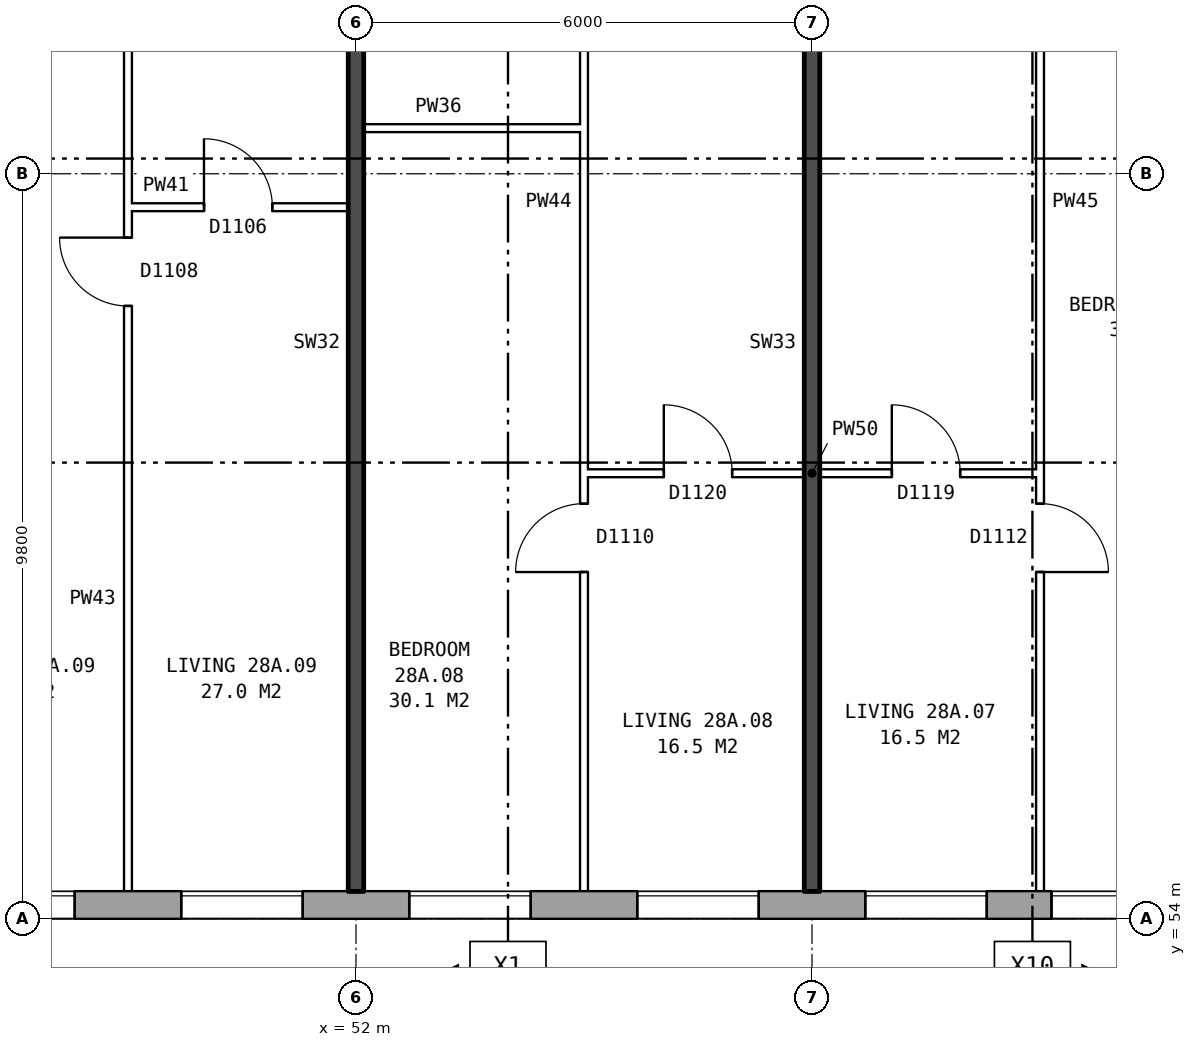
"""IFC4 building model, lengths in metres.
Left out: names, types, materials, properties, quantities, classifications, styles, units other than length and angle.
Written with IfcOpenShell. Run it as: python <this file> out.ifc"""

import sys

from ifc_helpers import new_model, si_unit, direction, frame, frame_2d, origin, place, context, subcontext, project, spatial, rectangle, extrude, element, fill, save


model = new_model("IFC4")
c1 = context("Model", 3, precision=1e-05, world=origin(), true_north=direction((0.0, 1.0)))
c2 = subcontext(c1, "Body", "Model", "MODEL_VIEW")
j1 = project(units=[si_unit("LENGTHUNIT", "METRE"), si_unit("PLANEANGLEUNIT", "RADIAN")], contexts=[c1])
p1 = place(None, origin())
s1 = spatial("IfcSite", under=j1, at=p1, CompositionType="ELEMENT")
p2 = place(p1, origin())
s2 = spatial("IfcBuilding", under=s1, at=p2, CompositionType="ELEMENT")
p3 = place(p2, frame((0.0, 0.0, 102.6)))
s3 = spatial("IfcBuildingStorey", under=s2, at=p3, CompositionType="ELEMENT", Elevation=102.6)
p4 = place(p3, frame((28.075, 54.18, 0.0), z_axis=(0.0, 0.0, 1.0), x_axis=(1.0, 0.0, 0.0)))
e1 = element("IfcWall", 1, at=p4, inside=s3, PredefinedType="STANDARD", context=c2, shape_type="SweptSolid", body=[
    extrude(rectangle(XDim=44.851, YDim=0.36, at=frame_2d((22.425, 0.0))), origin(), (0.0, 0.0, 1.0), 2.85),
])
p5 = place(p4, frame((0.625, 0.0, 0.8)))
e2 = element("IfcOpeningElement", 2, at=p5, cuts=e1, PredefinedType="OPENING", context=c2, shape_type="SweptSolid", body=[
    extrude(rectangle(XDim=1.6, YDim=1.8, at=frame_2d((0.8, 0.9))), frame((0.0, 0.19, 0.0), z_axis=(0.0, -1.0, 0.0), x_axis=(1.0, 0.0, 0.0)), (0.0, 0.0, 1.0), 0.38),
])
p6 = place(p4, frame((3.625, 0.0, 0.8)))
e3 = element("IfcOpeningElement", 3, at=p6, cuts=e1, PredefinedType="OPENING", context=c2, shape_type="SweptSolid", body=[
    extrude(rectangle(XDim=1.6, YDim=1.8, at=frame_2d((0.8, 0.9))), frame((0.0, 0.19, 0.0), z_axis=(0.0, -1.0, 0.0), x_axis=(1.0, 0.0, 0.0)), (0.0, 0.0, 1.0), 0.38),
])
p7 = place(p4, frame((6.125, 0.0, 1.0)))
e4 = element("IfcOpeningElement", 4, at=p7, cuts=e1, PredefinedType="OPENING", context=c2, shape_type="SweptSolid", body=[
    extrude(rectangle(XDim=0.6, YDim=1.5, at=frame_2d((0.3, 0.75))), frame((0.0, 0.19, 0.0), z_axis=(0.0, -1.0, 0.0), x_axis=(1.0, 0.0, 0.0)), (0.0, 0.0, 1.0), 0.38),
])
p8 = place(p4, frame((7.025, 0.0, 1.7)))
e5 = element("IfcOpeningElement", 5, at=p8, cuts=e1, PredefinedType="OPENING", context=c2, shape_type="SweptSolid", body=[
    extrude(rectangle(XDim=0.6, YDim=0.9, at=frame_2d((0.3, 0.45))), frame((0.0, 0.19, 0.0), z_axis=(0.0, -1.0, 0.0), x_axis=(1.0, 0.0, 0.0)), (0.0, 0.0, 1.0), 0.38),
])
p9 = place(p4, frame((12.625, 0.0, 0.8)))
e6 = element("IfcOpeningElement", 6, at=p9, cuts=e1, PredefinedType="OPENING", context=c2, shape_type="SweptSolid", body=[
    extrude(rectangle(XDim=1.6, YDim=1.8, at=frame_2d((0.8, 0.9))), frame((0.0, 0.19, 0.0), z_axis=(0.0, -1.0, 0.0), x_axis=(1.0, 0.0, 0.0)), (0.0, 0.0, 1.0), 0.38),
])
p10 = place(p4, frame((15.625, 0.0, 0.8)))
e7 = element("IfcOpeningElement", 7, at=p10, cuts=e1, PredefinedType="OPENING", context=c2, shape_type="SweptSolid", body=[
    extrude(rectangle(XDim=1.6, YDim=1.8, at=frame_2d((0.8, 0.9))), frame((0.0, 0.19, 0.0), z_axis=(0.0, -1.0, 0.0), x_axis=(1.0, 0.0, 0.0)), (0.0, 0.0, 1.0), 0.38),
])
p11 = place(p4, frame((18.625, 0.0, 0.8)))
e8 = element("IfcOpeningElement", 8, at=p11, cuts=e1, PredefinedType="OPENING", context=c2, shape_type="SweptSolid", body=[
    extrude(rectangle(XDim=1.6, YDim=1.8, at=frame_2d((0.8, 0.9))), frame((0.0, 0.19, 0.0), z_axis=(0.0, -1.0, 0.0), x_axis=(1.0, 0.0, 0.0)), (0.0, 0.0, 1.0), 0.38),
])
p12 = place(p4, frame((21.625, 0.0, 0.8)))
e9 = element("IfcOpeningElement", 9, at=p12, cuts=e1, PredefinedType="OPENING", context=c2, shape_type="SweptSolid", body=[
    extrude(rectangle(XDim=1.6, YDim=1.8, at=frame_2d((0.8, 0.9))), frame((0.0, 0.19, 0.0), z_axis=(0.0, -1.0, 0.0), x_axis=(1.0, 0.0, 0.0)), (0.0, 0.0, 1.0), 0.38),
])
p13 = place(p4, frame((24.625, 0.0, 0.8)))
e10 = element("IfcOpeningElement", 10, at=p13, cuts=e1, PredefinedType="OPENING", context=c2, shape_type="SweptSolid", body=[
    extrude(rectangle(XDim=1.6, YDim=1.8, at=frame_2d((0.8, 0.9))), frame((0.0, 0.19, 0.0), z_axis=(0.0, -1.0, 0.0), x_axis=(1.0, 0.0, 0.0)), (0.0, 0.0, 1.0), 0.38),
])
p14 = place(p4, frame((27.625, 0.0, 0.8)))
e11 = element("IfcOpeningElement", 11, at=p14, cuts=e1, PredefinedType="OPENING", context=c2, shape_type="SweptSolid", body=[
    extrude(rectangle(XDim=1.6, YDim=1.8, at=frame_2d((0.8, 0.9))), frame((0.0, 0.19, 0.0), z_axis=(0.0, -1.0, 0.0), x_axis=(1.0, 0.0, 0.0)), (0.0, 0.0, 1.0), 0.38),
])
p15 = place(p4, frame((30.625, 0.0, 0.8)))
e12 = element("IfcOpeningElement", 12, at=p15, cuts=e1, PredefinedType="OPENING", context=c2, shape_type="SweptSolid", body=[
    extrude(rectangle(XDim=1.6, YDim=1.8, at=frame_2d((0.8, 0.9))), frame((0.0, 0.19, 0.0), z_axis=(0.0, -1.0, 0.0), x_axis=(1.0, 0.0, 0.0)), (0.0, 0.0, 1.0), 0.38),
])
p16 = place(p4, frame((33.075, 0.0, 0.8)))
e13 = element("IfcOpeningElement", 13, at=p16, cuts=e1, PredefinedType="OPENING", context=c2, shape_type="SweptSolid", body=[
    extrude(rectangle(XDim=1.6, YDim=1.8, at=frame_2d((0.8, 0.9))), frame((0.0, 0.19, 0.0), z_axis=(0.0, -1.0, 0.0), x_axis=(1.0, 0.0, 0.0)), (0.0, 0.0, 1.0), 0.38),
])
p17 = place(p4, frame((37.175, 0.0, 1.7)))
e14 = element("IfcOpeningElement", 14, at=p17, cuts=e1, PredefinedType="OPENING", context=c2, shape_type="SweptSolid", body=[
    extrude(rectangle(XDim=1.0, YDim=0.9, at=frame_2d((0.5, 0.45))), frame((0.0, 0.19, 0.0), z_axis=(0.0, -1.0, 0.0), x_axis=(1.0, 0.0, 0.0)), (0.0, 0.0, 1.0), 0.38),
])
p18 = place(p4, frame((39.625, 0.0, 0.8)))
e15 = element("IfcOpeningElement", 15, at=p18, cuts=e1, PredefinedType="OPENING", context=c2, shape_type="SweptSolid", body=[
    extrude(rectangle(XDim=1.6, YDim=1.8, at=frame_2d((0.8, 0.9))), frame((0.0, 0.19, 0.0), z_axis=(0.0, -1.0, 0.0), x_axis=(1.0, 0.0, 0.0)), (0.0, 0.0, 1.0), 0.38),
])
p19 = place(p4, frame((42.625, 0.0, 0.8)))
e16 = element("IfcOpeningElement", 16, at=p19, cuts=e1, PredefinedType="OPENING", context=c2, shape_type="SweptSolid", body=[
    extrude(rectangle(XDim=1.6, YDim=1.8, at=frame_2d((0.8, 0.9))), frame((0.0, 0.19, 0.0), z_axis=(0.0, -1.0, 0.0), x_axis=(1.0, 0.0, 0.0)), (0.0, 0.0, 1.0), 0.38),
])
p20 = place(p4, frame((8.925, 0.0, 0.8)))
e17 = element("IfcOpeningElement", 17, at=p20, cuts=e1, PredefinedType="OPENING", context=c2, shape_type="SweptSolid", body=[
    extrude(rectangle(XDim=1.0, YDim=0.9, at=frame_2d((0.5, 0.45))), frame((0.0, 0.19, 0.0), z_axis=(0.0, -1.0, 0.0), x_axis=(1.0, 0.0, 0.0)), (0.0, 0.0, 1.0), 0.38),
])
p21 = place(p4, frame((10.225, 0.0, 0.8)))
e18 = element("IfcOpeningElement", 18, at=p21, cuts=e1, PredefinedType="OPENING", context=c2, shape_type="SweptSolid", body=[
    extrude(rectangle(XDim=1.4, YDim=1.8, at=frame_2d((0.7, 0.9))), frame((0.0, 0.19, 0.0), z_axis=(0.0, -1.0, 0.0), x_axis=(1.0, 0.0, 0.0)), (0.0, 0.0, 1.0), 0.38),
])
p22 = place(p4, frame((34.975, 0.0, 0.8)))
e19 = element("IfcOpeningElement", 19, at=p22, cuts=e1, PredefinedType="OPENING", context=c2, shape_type="SweptSolid", body=[
    extrude(rectangle(XDim=0.6, YDim=0.9, at=frame_2d((0.3, 0.45))), frame((0.0, 0.19, 0.0), z_axis=(0.0, -1.0, 0.0), x_axis=(1.0, 0.0, 0.0)), (0.0, 0.0, 1.0), 0.38),
])
p23 = place(p4, frame((38.475, 0.0, 0.8)))
e20 = element("IfcOpeningElement", 20, at=p23, cuts=e1, PredefinedType="OPENING", context=c2, shape_type="SweptSolid", body=[
    extrude(rectangle(XDim=0.8, YDim=1.8, at=frame_2d((0.4, 0.9))), frame((0.0, 0.19, 0.0), z_axis=(0.0, -1.0, 0.0), x_axis=(1.0, 0.0, 0.0)), (0.0, 0.0, 1.0), 0.38),
])
p24 = place(p3, frame((55.0, 59.86, 0.0), z_axis=(0.0, 0.0, 1.0), x_axis=(1.0, 0.0, 0.0)))
e21 = element("IfcWall", 21, at=p24, inside=s3, PredefinedType="PARTITIONING", context=c2, shape_type="SweptSolid", body=[
    extrude(rectangle(XDim=6.0, YDim=0.1, at=frame_2d((3.0, 0.0))), origin(), (0.0, 0.0, 1.0), 2.85),
])
p25 = place(p24, frame((4.05, 0.0, 0.0)))
e22 = element("IfcOpeningElement", 22, at=p25, cuts=e21, PredefinedType="OPENING", context=c2, shape_type="SweptSolid", body=[
    extrude(rectangle(XDim=0.9, YDim=2.1, at=frame_2d((0.45, 1.05))), frame((0.0, 0.06, 0.0), z_axis=(0.0, -1.0, 0.0), x_axis=(1.0, 0.0, 0.0)), (0.0, 0.0, 1.0), 0.12),
])
p26 = place(p24, frame((1.05, 0.0, 0.0)))
e23 = element("IfcOpeningElement", 23, at=p26, cuts=e21, PredefinedType="OPENING", context=c2, shape_type="SweptSolid", body=[
    extrude(rectangle(XDim=0.9, YDim=2.1, at=frame_2d((0.45, 1.05))), frame((0.0, 0.06, 0.0), z_axis=(0.0, -1.0, 0.0), x_axis=(1.0, 0.0, 0.0)), (0.0, 0.0, 1.0), 0.12),
])
p27 = place(p3, frame((49.0, 63.36, 0.0), z_axis=(0.0, 0.0, 1.0), x_axis=(1.0, 0.0, 0.0)))
e24 = element("IfcWall", 24, at=p27, inside=s3, PredefinedType="PARTITIONING", context=c2, shape_type="SweptSolid", body=[
    extrude(rectangle(XDim=2.9, YDim=0.1, at=frame_2d((1.45, 0.0))), origin(), (0.0, 0.0, 1.0), 2.85),
])
p28 = place(p27, frame((1.0, 0.0, 0.0)))
e25 = element("IfcOpeningElement", 25, at=p28, cuts=e24, PredefinedType="OPENING", context=c2, shape_type="SweptSolid", body=[
    extrude(rectangle(XDim=0.9, YDim=2.1, at=frame_2d((0.45, 1.05))), frame((0.0, 0.06, 0.0), z_axis=(0.0, -1.0, 0.0), x_axis=(1.0, 0.0, 0.0)), (0.0, 0.0, 1.0), 0.12),
])
p29 = place(p3, frame((52.1, 64.4, 0.0), z_axis=(0.0, 0.0, 1.0), x_axis=(1.0, 0.0, 0.0)))
e26 = element("IfcWall", 26, at=p29, inside=s3, PredefinedType="PARTITIONING", context=c2, shape_type="SweptSolid", body=[
    extrude(rectangle(XDim=2.9, YDim=0.1, at=frame_2d((1.45, 0.0))), origin(), (0.0, 0.0, 1.0), 2.85),
])
p30 = place(p3, frame((49.0, 54.36, 0.0), z_axis=(0.0, 0.0, 1.0), x_axis=(0.0, 1.0, 0.0)))
e27 = element("IfcWall", 27, at=p30, inside=s3, PredefinedType="PARTITIONING", context=c2, shape_type="SweptSolid", body=[
    extrude(rectangle(XDim=14.34, YDim=0.1, at=frame_2d((7.17, 0.0))), origin(), (0.0, 0.0, 1.0), 2.85),
])
p31 = place(p30, frame((7.7, 0.0, 0.0)))
e28 = element("IfcOpeningElement", 28, at=p31, cuts=e27, PredefinedType="OPENING", context=c2, shape_type="SweptSolid", body=[
    extrude(rectangle(XDim=0.9, YDim=2.1, at=frame_2d((0.45, 1.05))), frame((0.0, 0.06, 0.0), z_axis=(0.0, -1.0, 0.0), x_axis=(1.0, 0.0, 0.0)), (0.0, 0.0, 1.0), 0.12),
])
p32 = place(p30, frame((13.04, 0.0, 0.0)))
e29 = element("IfcOpeningElement", 29, at=p32, cuts=e27, PredefinedType="OPENING", context=c2, shape_type="SweptSolid", body=[
    extrude(rectangle(XDim=0.9, YDim=2.1, at=frame_2d((0.45, 1.05))), frame((0.0, 0.06, 0.0), z_axis=(0.0, -1.0, 0.0), x_axis=(1.0, 0.0, 0.0)), (0.0, 0.0, 1.0), 0.12),
])
p33 = place(p3, frame((52.0, 54.36, 0.0), z_axis=(0.0, 0.0, 1.0), x_axis=(0.0, 1.0, 0.0)))
e30 = element("IfcWall", 30, at=p33, inside=s3, PredefinedType="SOLIDWALL", context=c2, shape_type="SweptSolid", body=[
    extrude(rectangle(XDim=14.44, YDim=0.2, at=frame_2d((7.22, 0.0))), origin(), (0.0, 0.0, 1.0), 2.85),
])
p34 = place(p3, frame((55.0, 54.36, 0.0), z_axis=(0.0, 0.0, 1.0), x_axis=(0.0, 1.0, 0.0)))
e31 = element("IfcWall", 31, at=p34, inside=s3, PredefinedType="PARTITIONING", context=c2, shape_type="SweptSolid", body=[
    extrude(rectangle(XDim=14.34, YDim=0.1, at=frame_2d((7.17, 0.0))), origin(), (0.0, 0.0, 1.0), 2.85),
])
p35 = place(p34, frame((4.2, 0.0, 0.0)))
e32 = element("IfcOpeningElement", 32, at=p35, cuts=e31, PredefinedType="OPENING", context=c2, shape_type="SweptSolid", body=[
    extrude(rectangle(XDim=0.9, YDim=2.1, at=frame_2d((0.45, 1.05))), frame((0.0, 0.06, 0.0), z_axis=(0.0, -1.0, 0.0), x_axis=(1.0, 0.0, 0.0)), (0.0, 0.0, 1.0), 0.12),
])
p36 = place(p34, frame((13.04, 0.0, 0.0)))
e33 = element("IfcOpeningElement", 33, at=p36, cuts=e31, PredefinedType="OPENING", context=c2, shape_type="SweptSolid", body=[
    extrude(rectangle(XDim=0.9, YDim=2.1, at=frame_2d((0.45, 1.05))), frame((0.0, 0.06, 0.0), z_axis=(0.0, -1.0, 0.0), x_axis=(1.0, 0.0, 0.0)), (0.0, 0.0, 1.0), 0.12),
])
p37 = place(p3, frame((58.0, 54.36, 0.0), z_axis=(0.0, 0.0, 1.0), x_axis=(0.0, 1.0, 0.0)))
e34 = element("IfcWall", 34, at=p37, inside=s3, PredefinedType="SOLIDWALL", context=c2, shape_type="SweptSolid", body=[
    extrude(rectangle(XDim=14.44, YDim=0.2, at=frame_2d((7.22, 0.0))), origin(), (0.0, 0.0, 1.0), 2.85),
])
p38 = place(p3, frame((61.0, 54.36, 0.0), z_axis=(0.0, 0.0, 1.0), x_axis=(0.0, 1.0, 0.0)))
e35 = element("IfcWall", 35, at=p38, inside=s3, PredefinedType="PARTITIONING", context=c2, shape_type="SweptSolid", body=[
    extrude(rectangle(XDim=14.34, YDim=0.1, at=frame_2d((7.17, 0.0))), origin(), (0.0, 0.0, 1.0), 2.85),
])
p39 = place(p38, frame((4.2, 0.0, 0.0)))
e36 = element("IfcOpeningElement", 36, at=p39, cuts=e35, PredefinedType="OPENING", context=c2, shape_type="SweptSolid", body=[
    extrude(rectangle(XDim=0.9, YDim=2.1, at=frame_2d((0.45, 1.05))), frame((0.0, 0.06, 0.0), z_axis=(0.0, -1.0, 0.0), x_axis=(1.0, 0.0, 0.0)), (0.0, 0.0, 1.0), 0.12),
])
p40 = place(p38, frame((13.04, 0.0, 0.0)))
e37 = element("IfcOpeningElement", 37, at=p40, cuts=e35, PredefinedType="OPENING", context=c2, shape_type="SweptSolid", body=[
    extrude(rectangle(XDim=0.9, YDim=2.1, at=frame_2d((0.45, 1.05))), frame((0.0, 0.06, 0.0), z_axis=(0.0, -1.0, 0.0), x_axis=(1.0, 0.0, 0.0)), (0.0, 0.0, 1.0), 0.12),
])
p41 = place(p11, origin())
e38 = element("IfcWindow", 38, at=p41, inside=s3, PartitioningType="SINGLE_PANEL", PredefinedType="WINDOW", context=c2, shape_type="SweptSolid", body=[
    extrude(rectangle(XDim=1.6, YDim=1.8, at=frame_2d((0.8, 0.9))), frame((0.0, 0.15, 0.0), z_axis=(0.0, -1.0, 0.0), x_axis=(1.0, 0.0, 0.0)), (0.0, 0.0, 1.0), 0.06),
])
fill(e8, e38)
p42 = place(p12, origin())
e39 = element("IfcWindow", 39, at=p42, inside=s3, PartitioningType="SINGLE_PANEL", PredefinedType="WINDOW", context=c2, shape_type="SweptSolid", body=[
    extrude(rectangle(XDim=1.6, YDim=1.8, at=frame_2d((0.8, 0.9))), frame((0.0, 0.15, 0.0), z_axis=(0.0, -1.0, 0.0), x_axis=(1.0, 0.0, 0.0)), (0.0, 0.0, 1.0), 0.06),
])
fill(e9, e39)
p43 = place(p13, origin())
e40 = element("IfcWindow", 40, at=p43, inside=s3, PartitioningType="SINGLE_PANEL", PredefinedType="WINDOW", context=c2, shape_type="SweptSolid", body=[
    extrude(rectangle(XDim=1.6, YDim=1.8, at=frame_2d((0.8, 0.9))), frame((0.0, 0.15, 0.0), z_axis=(0.0, -1.0, 0.0), x_axis=(1.0, 0.0, 0.0)), (0.0, 0.0, 1.0), 0.06),
])
fill(e10, e40)
p44 = place(p14, origin())
e41 = element("IfcWindow", 41, at=p44, inside=s3, PartitioningType="SINGLE_PANEL", PredefinedType="WINDOW", context=c2, shape_type="SweptSolid", body=[
    extrude(rectangle(XDim=1.6, YDim=1.8, at=frame_2d((0.8, 0.9))), frame((0.0, 0.15, 0.0), z_axis=(0.0, -1.0, 0.0), x_axis=(1.0, 0.0, 0.0)), (0.0, 0.0, 1.0), 0.06),
])
fill(e11, e41)
p45 = place(p15, origin())
e42 = element("IfcWindow", 42, at=p45, inside=s3, PartitioningType="SINGLE_PANEL", PredefinedType="WINDOW", context=c2, shape_type="SweptSolid", body=[
    extrude(rectangle(XDim=1.6, YDim=1.8, at=frame_2d((0.8, 0.9))), frame((0.0, 0.15, 0.0), z_axis=(0.0, -1.0, 0.0), x_axis=(1.0, 0.0, 0.0)), (0.0, 0.0, 1.0), 0.06),
])
fill(e12, e42)
p46 = place(p16, origin())
e43 = element("IfcWindow", 43, at=p46, inside=s3, PartitioningType="SINGLE_PANEL", PredefinedType="WINDOW", context=c2, shape_type="SweptSolid", body=[
    extrude(rectangle(XDim=1.6, YDim=1.8, at=frame_2d((0.8, 0.9))), frame((0.0, 0.15, 0.0), z_axis=(0.0, -1.0, 0.0), x_axis=(1.0, 0.0, 0.0)), (0.0, 0.0, 1.0), 0.06),
])
fill(e13, e43)
p47 = place(p39, frame((0.9, 0.0, 0.0), z_axis=(0.0, 0.0, 1.0), x_axis=(-1.0, 0.0, 0.0)))
e44 = element("IfcDoor", 44, at=p47, inside=s3, OperationType="SINGLE_SWING_RIGHT", PredefinedType="DOOR", context=c2, shape_type="SweptSolid", body=[
    extrude(rectangle(XDim=0.9, YDim=2.1, at=frame_2d((0.45, 1.05))), frame((0.0, 0.025, 0.0), z_axis=(0.0, -1.0, 0.0), x_axis=(1.0, 0.0, 0.0)), (0.0, 0.0, 1.0), 0.05),
])
fill(e36, e44)
p48 = place(p25, origin())
e45 = element("IfcDoor", 45, at=p48, inside=s3, OperationType="SINGLE_SWING_LEFT", PredefinedType="DOOR", context=c2, shape_type="SweptSolid", body=[
    extrude(rectangle(XDim=0.9, YDim=2.1, at=frame_2d((0.45, 1.05))), frame((0.0, 0.025, 0.0), z_axis=(0.0, -1.0, 0.0), x_axis=(1.0, 0.0, 0.0)), (0.0, 0.0, 1.0), 0.05),
])
fill(e22, e45)
p49 = place(p35, origin())
e46 = element("IfcDoor", 46, at=p49, inside=s3, OperationType="SINGLE_SWING_LEFT", PredefinedType="DOOR", context=c2, shape_type="SweptSolid", body=[
    extrude(rectangle(XDim=0.9, YDim=2.1, at=frame_2d((0.45, 1.05))), frame((0.0, 0.025, 0.0), z_axis=(0.0, -1.0, 0.0), x_axis=(1.0, 0.0, 0.0)), (0.0, 0.0, 1.0), 0.05),
])
fill(e32, e46)
p50 = place(p26, origin())
e47 = element("IfcDoor", 47, at=p50, inside=s3, OperationType="SINGLE_SWING_LEFT", PredefinedType="DOOR", context=c2, shape_type="SweptSolid", body=[
    extrude(rectangle(XDim=0.9, YDim=2.1, at=frame_2d((0.45, 1.05))), frame((0.0, 0.025, 0.0), z_axis=(0.0, -1.0, 0.0), x_axis=(1.0, 0.0, 0.0)), (0.0, 0.0, 1.0), 0.05),
])
fill(e23, e47)
p51 = place(p31, origin())
e48 = element("IfcDoor", 48, at=p51, inside=s3, OperationType="SINGLE_SWING_RIGHT", PredefinedType="DOOR", context=c2, shape_type="SweptSolid", body=[
    extrude(rectangle(XDim=0.9, YDim=2.1, at=frame_2d((0.45, 1.05))), frame((0.0, 0.025, 0.0), z_axis=(0.0, -1.0, 0.0), x_axis=(1.0, 0.0, 0.0)), (0.0, 0.0, 1.0), 0.05),
])
fill(e28, e48)
p52 = place(p28, origin())
e49 = element("IfcDoor", 49, at=p52, inside=s3, OperationType="SINGLE_SWING_LEFT", PredefinedType="DOOR", context=c2, shape_type="SweptSolid", body=[
    extrude(rectangle(XDim=0.9, YDim=2.1, at=frame_2d((0.45, 1.05))), frame((0.0, 0.025, 0.0), z_axis=(0.0, -1.0, 0.0), x_axis=(1.0, 0.0, 0.0)), (0.0, 0.0, 1.0), 0.05),
])
fill(e25, e49)
save(model, sys.argv[1])
